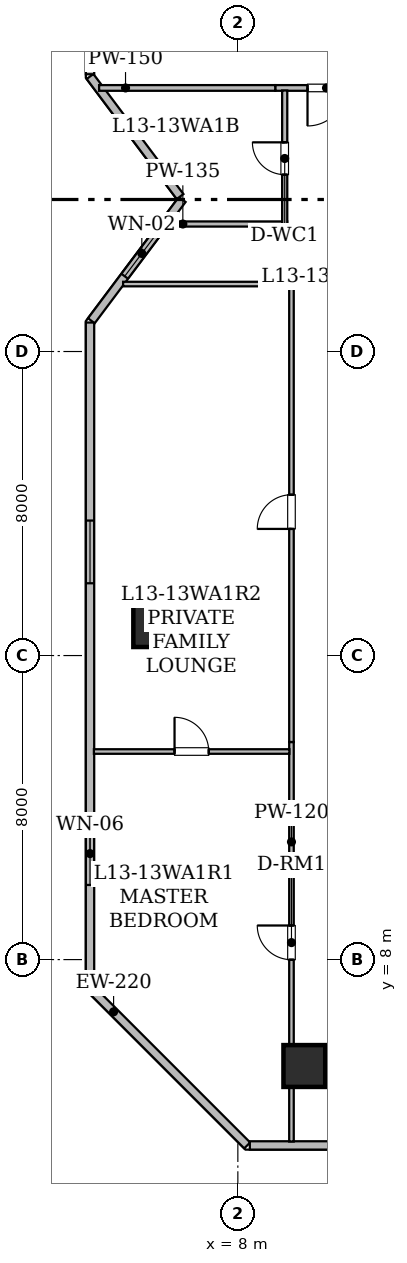
"""IFC4 building model, lengths in metres.
Left out: names, types, materials, properties, quantities, classifications, styles, units other than length and angle.
Written with IfcOpenShell. Run it as: python <this file> out.ifc"""

import sys

from ifc_helpers import new_model, si_unit, direction, frame, frame_2d, origin, origin_2d, place, context, subcontext, project, spatial, rectangle, hollow_rectangle, extrude, element, fill, save


model = new_model("IFC4")
c1 = context("Model", 3, precision=1e-05, world=origin(), true_north=direction((0.0, 1.0)))
c2 = subcontext(c1, "Body", "Model", "MODEL_VIEW")
j1 = project(units=[si_unit("LENGTHUNIT", "METRE"), si_unit("PLANEANGLEUNIT", "RADIAN")], contexts=[c1])
p1 = place(None, origin())
s1 = spatial("IfcSite", under=j1, at=p1, CompositionType="ELEMENT")
p2 = place(p1, origin())
s2 = spatial("IfcBuilding", under=s1, at=p2, CompositionType="ELEMENT")
p3 = place(p2, frame((0.0, 0.0, 55.2)))
s3 = spatial("IfcBuildingStorey", under=s2, at=p3, CompositionType="ELEMENT", Elevation=55.2)
for number, where, z_axis, x_axis in (
    (1, (9.75, 5.2, 0.0), (0.0, 0.0, 1.0), (1.0, 0.0, 0.0)),
    (2, (5.8, 16.775, 0.0), (0.0, 0.0, 1.0), (1.0, 0.0, 0.0)),
):
    element("IfcColumn", number, at=place(p3, frame(where, z_axis=z_axis, x_axis=x_axis)), inside=s3, PredefinedType="COLUMN", context=c2, shape_type="SweptSolid", body=[
        extrude(hollow_rectangle(XDim=1.1, YDim=1.1, WallThickness=0.055, at=origin_2d()), origin(), (0.0, 0.0, 1.0), 3.65),
    ])
p4 = place(p3, frame((8.246, 3.11, 0.0), z_axis=(0.0, 0.0, 1.0), x_axis=(-0.707106781187, 0.707106781187, 0.0)))
e3 = element("IfcWall", 3, at=p4, inside=s3, PredefinedType="STANDARD", context=c2, shape_type="SweptSolid", body=[
    extrude(rectangle(XDim=5.849, YDim=0.22, at=frame_2d((2.925, 0.0))), origin(), (0.0, 0.0, 1.0), 3.43),
])
p5 = place(p3, frame((4.11, 7.317, 0.0), z_axis=(0.0, 0.0, 1.0), x_axis=(0.0, 1.0, 0.0)))
e4 = element("IfcWall", 4, at=p5, inside=s3, PredefinedType="STANDARD", context=c2, shape_type="SweptSolid", body=[
    extrude(rectangle(XDim=17.446, YDim=0.22, at=frame_2d((8.723, 0.0))), origin(), (0.0, 0.0, 1.0), 3.43),
])
p6 = place(p5, frame((2.647, 0.0, 0.85)))
e5 = element("IfcOpeningElement", 5, at=p6, cuts=e4, PredefinedType="OPENING", context=c2, shape_type="SweptSolid", body=[
    extrude(rectangle(XDim=1.65, YDim=1.55, at=frame_2d((0.825, 0.775))), frame((0.0, 0.12, 0.0), z_axis=(0.0, -1.0, 0.0), x_axis=(1.0, 0.0, 0.0)), (0.0, 0.0, 1.0), 0.24),
])
p7 = place(p5, frame((10.585, 0.0, 0.85)))
e6 = element("IfcOpeningElement", 6, at=p7, cuts=e4, PredefinedType="OPENING", context=c2, shape_type="SweptSolid", body=[
    extrude(rectangle(XDim=1.65, YDim=1.55, at=frame_2d((0.825, 0.775))), frame((0.0, 0.12, 0.0), z_axis=(0.0, -1.0, 0.0), x_axis=(1.0, 0.0, 0.0)), (0.0, 0.0, 1.0), 0.24),
])
p8 = place(p3, frame((4.145, 24.809, 0.0), z_axis=(0.0, 0.0, 1.0), x_axis=(0.599823674734, 0.800132213592, 0.0)))
e7 = element("IfcWall", 7, at=p8, inside=s3, PredefinedType="STANDARD", context=c2, shape_type="SweptSolid", body=[
    extrude(rectangle(XDim=3.988, YDim=0.22, at=frame_2d((1.994, 0.0))), origin(), (0.0, 0.0, 1.0), 3.43),
])
p9 = place(p8, frame((1.464, 0.0, 0.85)))
e8 = element("IfcOpeningElement", 8, at=p9, cuts=e7, PredefinedType="OPENING", context=c2, shape_type="SweptSolid", body=[
    extrude(rectangle(XDim=1.5, YDim=1.6, at=frame_2d((0.75, 0.8))), frame((0.0, 0.12, 0.0), z_axis=(0.0, -1.0, 0.0), x_axis=(1.0, 0.0, 0.0)), (0.0, 0.0, 1.0), 0.24),
])
p10 = place(p3, frame((6.48, 28.077, 0.0), z_axis=(0.0, 0.0, 1.0), x_axis=(-0.599960442794, 0.800029666377, 0.0)))
e9 = element("IfcWall", 9, at=p10, inside=s3, PredefinedType="STANDARD", context=c2, shape_type="SweptSolid", body=[
    extrude(rectangle(XDim=3.95, YDim=0.22, at=frame_2d((1.975, 0.0))), origin(), (0.0, 0.0, 1.0), 3.43),
])
p11 = place(p3, frame((4.11, 31.295, 0.0), z_axis=(0.0, 0.0, 1.0), x_axis=(0.0, 1.0, 0.0)))
e10 = element("IfcWall", 10, at=p11, inside=s3, PredefinedType="STANDARD", context=c2, shape_type="SweptSolid", body=[
    extrude(rectangle(XDim=17.459, YDim=0.22, at=frame_2d((8.729, 0.0))), origin(), (0.0, 0.0, 1.0), 3.43),
])
p12 = place(p11, frame((11.302, 0.0, 0.0)))
e11 = element("IfcOpeningElement", 11, at=p12, cuts=e10, PredefinedType="OPENING", context=c2, shape_type="SweptSolid", body=[
    extrude(rectangle(XDim=1.1, YDim=2.2, at=frame_2d((0.55, 1.1))), frame((0.0, 0.12, 0.0), z_axis=(0.0, -1.0, 0.0), x_axis=(1.0, 0.0, 0.0)), (0.0, 0.0, 1.0), 0.24),
])
p13 = place(p11, frame((5.865, 0.0, 0.85)))
e12 = element("IfcOpeningElement", 12, at=p13, cuts=e10, PredefinedType="OPENING", context=c2, shape_type="SweptSolid", body=[
    extrude(rectangle(XDim=1.65, YDim=1.55, at=frame_2d((0.825, 0.775))), frame((0.0, 0.12, 0.0), z_axis=(0.0, -1.0, 0.0), x_axis=(1.0, 0.0, 0.0)), (0.0, 0.0, 1.0), 0.24),
])
p14 = place(p3, frame((45.683, 3.11, 0.0), z_axis=(0.0, 0.0, 1.0), x_axis=(-1.0, 0.0, 0.0)))
e13 = element("IfcWall", 13, at=p14, inside=s3, PredefinedType="STANDARD", context=c2, shape_type="SweptSolid", body=[
    extrude(rectangle(XDim=37.368, YDim=0.22, at=frame_2d((18.684, 0.0))), origin(), (0.0, 0.0, 1.0), 3.43),
])
p15 = place(p14, frame((31.194, 0.0, 0.85)))
e14 = element("IfcOpeningElement", 14, at=p15, cuts=e13, PredefinedType="OPENING", context=c2, shape_type="SweptSolid", body=[
    extrude(rectangle(XDim=1.65, YDim=1.55, at=frame_2d((0.825, 0.775))), frame((0.0, 0.12, 0.0), z_axis=(0.0, -1.0, 0.0), x_axis=(1.0, 0.0, 0.0)), (0.0, 0.0, 1.0), 0.24),
])
p16 = place(p14, frame((19.615, 0.0, 0.85)))
e15 = element("IfcOpeningElement", 15, at=p16, cuts=e13, PredefinedType="OPENING", context=c2, shape_type="SweptSolid", body=[
    extrude(rectangle(XDim=1.65, YDim=1.55, at=frame_2d((0.825, 0.775))), frame((0.0, 0.12, 0.0), z_axis=(0.0, -1.0, 0.0), x_axis=(1.0, 0.0, 0.0)), (0.0, 0.0, 1.0), 0.24),
])
p17 = place(p14, frame((22.223, 0.0, 0.8)))
e16 = element("IfcOpeningElement", 16, at=p17, cuts=e13, PredefinedType="OPENING", context=c2, shape_type="SweptSolid", body=[
    extrude(rectangle(XDim=1.2, YDim=1.5, at=frame_2d((0.6, 0.75))), frame((0.0, 0.12, 0.0), z_axis=(0.0, -1.0, 0.0), x_axis=(1.0, 0.0, 0.0)), (0.0, 0.0, 1.0), 0.24),
])
p18 = place(p14, frame((25.65, 0.0, 0.85)))
e17 = element("IfcOpeningElement", 17, at=p18, cuts=e13, PredefinedType="OPENING", context=c2, shape_type="SweptSolid", body=[
    extrude(rectangle(XDim=1.65, YDim=1.55, at=frame_2d((0.825, 0.775))), frame((0.0, 0.12, 0.0), z_axis=(0.0, -1.0, 0.0), x_axis=(1.0, 0.0, 0.0)), (0.0, 0.0, 1.0), 0.24),
])
p19 = place(p14, frame((10.983, 0.0, 0.8)))
e18 = element("IfcOpeningElement", 18, at=p19, cuts=e13, PredefinedType="OPENING", context=c2, shape_type="SweptSolid", body=[
    extrude(rectangle(XDim=1.2, YDim=1.5, at=frame_2d((0.6, 0.75))), frame((0.0, 0.12, 0.0), z_axis=(0.0, -1.0, 0.0), x_axis=(1.0, 0.0, 0.0)), (0.0, 0.0, 1.0), 0.24),
])
p20 = place(p14, frame((14.783, 0.0, 0.85)))
e19 = element("IfcOpeningElement", 19, at=p20, cuts=e13, PredefinedType="OPENING", context=c2, shape_type="SweptSolid", body=[
    extrude(rectangle(XDim=1.65, YDim=1.55, at=frame_2d((0.825, 0.775))), frame((0.0, 0.12, 0.0), z_axis=(0.0, -1.0, 0.0), x_axis=(1.0, 0.0, 0.0)), (0.0, 0.0, 1.0), 0.24),
])
p21 = place(p14, frame((6.733, 0.0, 0.85)))
e20 = element("IfcOpeningElement", 20, at=p21, cuts=e13, PredefinedType="OPENING", context=c2, shape_type="SweptSolid", body=[
    extrude(rectangle(XDim=1.65, YDim=1.55, at=frame_2d((0.825, 0.775))), frame((0.0, 0.12, 0.0), z_axis=(0.0, -1.0, 0.0), x_axis=(1.0, 0.0, 0.0)), (0.0, 0.0, 1.0), 0.24),
])
p22 = place(p14, frame((1.738, 0.0, 0.85)))
e21 = element("IfcOpeningElement", 21, at=p22, cuts=e13, PredefinedType="OPENING", context=c2, shape_type="SweptSolid", body=[
    extrude(rectangle(XDim=1.65, YDim=1.55, at=frame_2d((0.825, 0.775))), frame((0.0, 0.12, 0.0), z_axis=(0.0, -1.0, 0.0), x_axis=(1.0, 0.0, 0.0)), (0.0, 0.0, 1.0), 0.24),
])
p23 = place(p3, frame((11.682, 30.935, 0.0), z_axis=(0.0, 0.0, 1.0), x_axis=(-1.0, 0.0, 0.0)))
e22 = element("IfcWall", 22, at=p23, inside=s3, PredefinedType="STANDARD", context=c2, shape_type="SweptSolid", body=[
    extrude(rectangle(XDim=2.698, YDim=0.15, at=frame_2d((1.349, 0.0))), origin(), (0.0, 0.0, 1.0), 3.43),
])
p24 = place(p23, frame((0.849, 0.0, 0.0)))
e23 = element("IfcOpeningElement", 23, at=p24, cuts=e22, PredefinedType="OPENING", context=c2, shape_type="SweptSolid", body=[
    extrude(rectangle(XDim=1.0, YDim=2.15, at=frame_2d((0.5, 1.075))), frame((0.0, 0.085, 0.0), z_axis=(0.0, -1.0, 0.0), x_axis=(1.0, 0.0, 0.0)), (0.0, 0.0, 1.0), 0.17),
])
p25 = place(p3, frame((8.984, 30.935, 0.0), z_axis=(0.0, 0.0, 1.0), x_axis=(-1.0, 0.0, 0.0)))
e24 = element("IfcWall", 24, at=p25, inside=s3, PredefinedType="STANDARD", context=c2, shape_type="SweptSolid", body=[
    extrude(rectangle(XDim=4.635, YDim=0.15, at=frame_2d((2.317, 0.0))), origin(), (0.0, 0.0, 1.0), 2.803),
])
p26 = place(p3, frame((6.068, 27.355, 0.0), z_axis=(0.0, 0.0, 1.0), x_axis=(1.0, 0.0, 0.0)))
e25 = element("IfcWall", 25, at=p26, inside=s3, PredefinedType="PARTITIONING", context=c2, shape_type="SweptSolid", body=[
    extrude(rectangle(XDim=3.23, YDim=0.135, at=frame_2d((1.615, 0.0))), origin(), (0.0, 0.0, 1.0), 3.43),
])
p27 = place(p3, frame((9.233, 27.29, 0.0), z_axis=(0.0, 0.0, 1.0), x_axis=(0.0, 1.0, 0.0)))
e26 = element("IfcWall", 26, at=p27, inside=s3, PredefinedType="PARTITIONING", context=c2, shape_type="SweptSolid", body=[
    extrude(rectangle(XDim=3.578, YDim=0.135, at=frame_2d((1.789, 0.0))), origin(), (0.0, 0.0, 1.0), 3.43),
])
p28 = place(p27, frame((1.364, 0.0, 0.0)))
e27 = element("IfcOpeningElement", 27, at=p28, cuts=e26, PredefinedType="OPENING", context=c2, shape_type="SweptSolid", body=[
    extrude(rectangle(XDim=0.85, YDim=2.1, at=frame_2d((0.425, 1.05))), frame((0.0, 0.077, 0.0), z_axis=(0.0, -1.0, 0.0), x_axis=(1.0, 0.0, 0.0)), (0.0, 0.0, 1.0), 0.155),
])
p29 = place(p3, frame((9.411, 3.212, 0.0), z_axis=(0.0, 0.0, 1.0), x_axis=(0.0, 1.0, 0.0)))
e28 = element("IfcWall", 28, at=p29, inside=s3, PredefinedType="PARTITIONING", context=c2, shape_type="SweptSolid", body=[
    extrude(rectangle(XDim=10.513, YDim=0.12, at=frame_2d((5.257, 0.0))), origin(), (0.0, 0.0, 1.0), 2.647),
])
p30 = place(p29, frame((4.785, 0.0, 0.0)))
e29 = element("IfcOpeningElement", 29, at=p30, cuts=e28, PredefinedType="OPENING", context=c2, shape_type="SweptSolid", body=[
    extrude(rectangle(XDim=0.9, YDim=2.1, at=frame_2d((0.45, 1.05))), frame((0.0, 0.07, 0.0), z_axis=(0.0, -1.0, 0.0), x_axis=(1.0, 0.0, 0.0)), (0.0, 0.0, 1.0), 0.14),
])
p31 = place(p3, frame((9.411, 13.725, 0.0), z_axis=(0.0, 0.0, 1.0), x_axis=(0.0, 1.0, 0.0)))
e30 = element("IfcWall", 30, at=p31, inside=s3, PredefinedType="PARTITIONING", context=c2, shape_type="SweptSolid", body=[
    extrude(rectangle(XDim=12.115, YDim=0.12, at=frame_2d((6.058, 0.0))), origin(), (0.0, 0.0, 1.0), 2.647),
])
p32 = place(p31, frame((5.607, 0.0, 0.0)))
e31 = element("IfcOpeningElement", 31, at=p32, cuts=e30, PredefinedType="OPENING", context=c2, shape_type="SweptSolid", body=[
    extrude(rectangle(XDim=0.9, YDim=2.1, at=frame_2d((0.45, 1.05))), frame((0.0, 0.07, 0.0), z_axis=(0.0, -1.0, 0.0), x_axis=(1.0, 0.0, 0.0)), (0.0, 0.0, 1.0), 0.14),
])
p33 = place(p3, frame((9.357, 25.775, 0.0), z_axis=(0.0, 0.0, 1.0), x_axis=(-1.0, 0.0, 0.0)))
e32 = element("IfcWall", 32, at=p33, inside=s3, PredefinedType="PARTITIONING", context=c2, shape_type="SweptSolid", body=[
    extrude(rectangle(XDim=4.376, YDim=0.12, at=frame_2d((2.188, 0.0))), origin(), (0.0, 0.0, 1.0), 2.803),
])
p34 = place(p3, frame((4.212, 13.475, 0.0), z_axis=(0.0, 0.0, 1.0), x_axis=(1.0, 0.0, 0.0)))
e33 = element("IfcWall", 33, at=p34, inside=s3, PredefinedType="PARTITIONING", context=c2, shape_type="SweptSolid", body=[
    extrude(rectangle(XDim=5.145, YDim=0.12, at=frame_2d((2.573, 0.0))), origin(), (0.0, 0.0, 1.0), 2.803),
])
p35 = place(p34, frame((2.122, 0.0, 0.0)))
e34 = element("IfcOpeningElement", 34, at=p35, cuts=e33, PredefinedType="OPENING", context=c2, shape_type="SweptSolid", body=[
    extrude(rectangle(XDim=0.9, YDim=2.1, at=frame_2d((0.45, 1.05))), frame((0.0, 0.07, 0.0), z_axis=(0.0, -1.0, 0.0), x_axis=(1.0, 0.0, 0.0)), (0.0, 0.0, 1.0), 0.14),
])
p36 = place(p9, origin())
e35 = element("IfcWindow", 35, at=p36, inside=s3, PartitioningType="SINGLE_PANEL", PredefinedType="WINDOW", context=c2, shape_type="SweptSolid", body=[
    extrude(rectangle(XDim=1.5, YDim=1.6, at=frame_2d((0.75, 0.8))), frame((0.0, 0.03, 0.0), z_axis=(0.0, -1.0, 0.0), x_axis=(1.0, 0.0, 0.0)), (0.0, 0.0, 1.0), 0.06),
])
fill(e8, e35)
p37 = place(p6, origin())
e36 = element("IfcWindow", 36, at=p37, inside=s3, PartitioningType="SINGLE_PANEL", PredefinedType="WINDOW", context=c2, shape_type="SweptSolid", body=[
    extrude(rectangle(XDim=1.65, YDim=1.55, at=frame_2d((0.825, 0.775))), frame((0.0, 0.03, 0.0), z_axis=(0.0, -1.0, 0.0), x_axis=(1.0, 0.0, 0.0)), (0.0, 0.0, 1.0), 0.06),
])
fill(e5, e36)
p38 = place(p7, origin())
e37 = element("IfcWindow", 37, at=p38, inside=s3, PartitioningType="SINGLE_PANEL", PredefinedType="WINDOW", context=c2, shape_type="SweptSolid", body=[
    extrude(rectangle(XDim=1.65, YDim=1.55, at=frame_2d((0.825, 0.775))), frame((0.0, 0.03, 0.0), z_axis=(0.0, -1.0, 0.0), x_axis=(1.0, 0.0, 0.0)), (0.0, 0.0, 1.0), 0.06),
])
fill(e6, e37)
p39 = place(p24, origin())
e38 = element("IfcDoor", 38, at=p39, inside=s3, OperationType="SINGLE_SWING_RIGHT", PredefinedType="DOOR", context=c2, shape_type="SweptSolid", body=[
    extrude(rectangle(XDim=1.0, YDim=2.15, at=frame_2d((0.5, 1.075))), frame((0.0, 0.025, 0.0), z_axis=(0.0, -1.0, 0.0), x_axis=(1.0, 0.0, 0.0)), (0.0, 0.0, 1.0), 0.05),
])
fill(e23, e38)
p40 = place(p28, origin())
e39 = element("IfcDoor", 39, at=p40, inside=s3, OperationType="SINGLE_SWING_RIGHT", PredefinedType="DOOR", context=c2, shape_type="SweptSolid", body=[
    extrude(rectangle(XDim=0.85, YDim=2.1, at=frame_2d((0.425, 1.05))), frame((0.0, 0.025, 0.0), z_axis=(0.0, -1.0, 0.0), x_axis=(1.0, 0.0, 0.0)), (0.0, 0.0, 1.0), 0.05),
])
fill(e27, e39)
p41 = place(p30, origin())
e40 = element("IfcDoor", 40, at=p41, inside=s3, OperationType="SINGLE_SWING_RIGHT", PredefinedType="DOOR", context=c2, shape_type="SweptSolid", body=[
    extrude(rectangle(XDim=0.9, YDim=2.1, at=frame_2d((0.45, 1.05))), frame((0.0, 0.025, 0.0), z_axis=(0.0, -1.0, 0.0), x_axis=(1.0, 0.0, 0.0)), (0.0, 0.0, 1.0), 0.05),
])
fill(e29, e40)
p42 = place(p32, origin())
e41 = element("IfcDoor", 41, at=p42, inside=s3, OperationType="SINGLE_SWING_LEFT", PredefinedType="DOOR", context=c2, shape_type="SweptSolid", body=[
    extrude(rectangle(XDim=0.9, YDim=2.1, at=frame_2d((0.45, 1.05))), frame((0.0, 0.025, 0.0), z_axis=(0.0, -1.0, 0.0), x_axis=(1.0, 0.0, 0.0)), (0.0, 0.0, 1.0), 0.05),
])
fill(e31, e41)
p43 = place(p35, origin())
e42 = element("IfcDoor", 42, at=p43, inside=s3, OperationType="SINGLE_SWING_LEFT", PredefinedType="DOOR", context=c2, shape_type="SweptSolid", body=[
    extrude(rectangle(XDim=0.9, YDim=2.1, at=frame_2d((0.45, 1.05))), frame((0.0, 0.025, 0.0), z_axis=(0.0, -1.0, 0.0), x_axis=(1.0, 0.0, 0.0)), (0.0, 0.0, 1.0), 0.05),
])
fill(e34, e42)
save(model, sys.argv[1])
